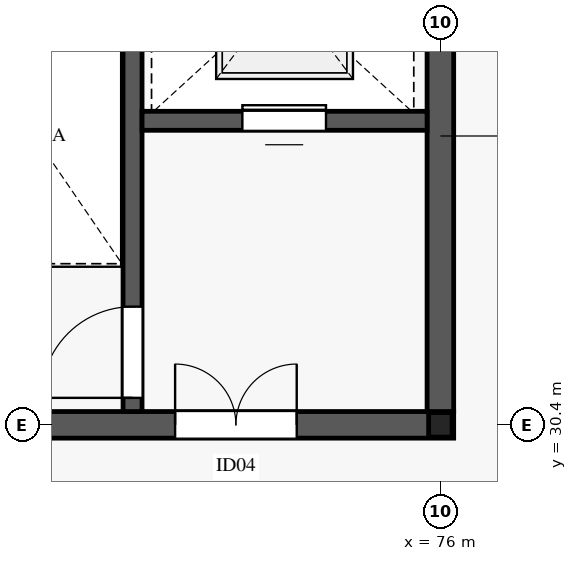
"""IFC4 building model, lengths in metres.
Left out: names, types, materials, properties, quantities, classifications, styles, units other than length and angle.
Written with IfcOpenShell. Run it as: python <this file> out.ifc"""

import sys

from ifc_helpers import new_model, si_unit, direction, frame, frame_2d, origin, origin_2d, place, context, subcontext, project, spatial, rectangle, i_section, extrude, element, fill, save


model = new_model("IFC4")
c1 = context("Model", 3, precision=1e-05, world=origin(), true_north=direction((0.0, 1.0)))
c2 = subcontext(c1, "Body", "Model", "MODEL_VIEW")
j1 = project(units=[si_unit("LENGTHUNIT", "METRE"), si_unit("PLANEANGLEUNIT", "RADIAN")], contexts=[c1])
p1 = place(None, origin())
s1 = spatial("IfcSite", under=j1, at=p1, CompositionType="ELEMENT")
p2 = place(p1, origin())
s2 = spatial("IfcBuilding", under=s1, at=p2, CompositionType="ELEMENT")
p3 = place(p2, frame((0.0, 0.0, 20.4)))
s3 = spatial("IfcBuildingStorey", under=s2, at=p3, CompositionType="ELEMENT", Elevation=20.4)
p4 = place(p3, frame((76.0, 30.4, 0.0), z_axis=(0.0, 0.0, 1.0), x_axis=(1.0, 0.0, 0.0)))
e1 = element("IfcColumn", 1, at=p4, inside=s3, PredefinedType="COLUMN", context=c2, shape_type="SweptSolid", body=[
    extrude(i_section(OverallWidth=0.309, OverallDepth=0.323, WebThickness=0.014, FlangeThickness=0.023, FilletRadius=0.015, at=origin_2d()), origin(), (0.0, 0.0, 1.0), 4.595),
])
p5 = place(p3, frame((67.825, 30.4, 0.0), z_axis=(0.0, 0.0, 1.0), x_axis=(1.0, 0.0, 0.0)))
e2 = element("IfcWall", 2, at=p5, inside=s3, PredefinedType="SHEAR", context=c2, shape_type="SweptSolid", body=[
    extrude(rectangle(XDim=8.35, YDim=0.35, at=frame_2d((4.175, 0.0))), origin(), (0.0, 0.0, 1.0), 4.59),
])
p6 = place(p5, frame((4.685, 0.0, 0.0)))
e3 = element("IfcOpeningElement", 3, at=p6, cuts=e2, PredefinedType="OPENING", context=c2, shape_type="SweptSolid", body=[
    extrude(rectangle(XDim=1.6, YDim=2.35, at=frame_2d((0.8, 1.175))), frame((0.0, 0.185, 0.0), z_axis=(0.0, -1.0, 0.0), x_axis=(1.0, 0.0, 0.0)), (0.0, 0.0, 1.0), 0.37),
])
p7 = place(p3, frame((76.0, 30.575, 0.0), z_axis=(0.0, 0.0, 1.0), x_axis=(0.0, 1.0, 0.0)))
e4 = element("IfcWall", 4, at=p7, inside=s3, PredefinedType="SHEAR", context=c2, shape_type="SweptSolid", body=[
    extrude(rectangle(XDim=7.25, YDim=0.35, at=frame_2d((3.625, 0.0))), origin(), (0.0, 0.0, 1.0), 4.59),
])
p8 = place(p3, frame((71.95, 30.575, 0.0), z_axis=(0.0, 0.0, 1.0), x_axis=(0.0, 1.0, 0.0)))
e5 = element("IfcWall", 5, at=p8, inside=s3, PredefinedType="SHEAR", context=c2, shape_type="SweptSolid", body=[
    extrude(rectangle(XDim=7.25, YDim=0.25, at=frame_2d((3.625, 0.0))), origin(), (0.0, 0.0, 1.0), 4.59),
])
p9 = place(p8, frame((0.18, 0.0, 0.0)))
e6 = element("IfcOpeningElement", 6, at=p9, cuts=e5, PredefinedType="OPENING", context=c2, shape_type="SweptSolid", body=[
    extrude(rectangle(XDim=1.2, YDim=2.2, at=frame_2d((0.6, 1.1))), frame((0.0, 0.135, 0.0), z_axis=(0.0, -1.0, 0.0), x_axis=(1.0, 0.0, 0.0)), (0.0, 0.0, 1.0), 0.27),
])
p10 = place(p3, frame((72.075, 34.4, 0.0), z_axis=(0.0, 0.0, 1.0), x_axis=(1.0, 0.0, 0.0)))
e7 = element("IfcWall", 7, at=p10, inside=s3, PredefinedType="SHEAR", context=c2, shape_type="SweptSolid", body=[
    extrude(rectangle(XDim=3.75, YDim=0.25, at=frame_2d((1.875, 0.0))), origin(), (0.0, 0.0, 1.0), 4.59),
])
p11 = place(p10, frame((1.32, 0.0, 0.0)))
e8 = element("IfcOpeningElement", 8, at=p11, cuts=e7, PredefinedType="OPENING", context=c2, shape_type="SweptSolid", body=[
    extrude(rectangle(XDim=1.1, YDim=2.2, at=frame_2d((0.55, 1.1))), frame((0.0, 0.135, 0.0), z_axis=(0.0, -1.0, 0.0), x_axis=(1.0, 0.0, 0.0)), (0.0, 0.0, 1.0), 0.27),
])
p12 = place(p9, origin())
e9 = element("IfcDoor", 9, at=p12, inside=s3, OperationType="SINGLE_SWING_LEFT", PredefinedType="DOOR", context=c2, shape_type="SweptSolid", body=[
    extrude(rectangle(XDim=1.2, YDim=2.2, at=frame_2d((0.6, 1.1))), frame((0.0, 0.025, 0.0), z_axis=(0.0, -1.0, 0.0), x_axis=(1.0, 0.0, 0.0)), (0.0, 0.0, 1.0), 0.05),
])
fill(e6, e9)
p13 = place(p6, origin())
e10 = element("IfcDoor", 10, at=p13, inside=s3, OperationType="DOUBLE_DOOR_SINGLE_SWING", PredefinedType="DOOR", context=c2, shape_type="SweptSolid", body=[
    extrude(rectangle(XDim=1.6, YDim=2.35, at=frame_2d((0.8, 1.175))), frame((0.0, 0.025, 0.0), z_axis=(0.0, -1.0, 0.0), x_axis=(1.0, 0.0, 0.0)), (0.0, 0.0, 1.0), 0.05),
])
fill(e3, e10)
p14 = place(p11, origin())
e11 = element("IfcDoor", 11, at=p14, inside=s3, OperationType="SLIDING_TO_LEFT", PredefinedType="DOOR", context=c2, shape_type="SweptSolid", body=[
    extrude(rectangle(XDim=1.1, YDim=2.2, at=frame_2d((0.55, 1.1))), frame((0.0, 0.025, 0.0), z_axis=(0.0, -1.0, 0.0), x_axis=(1.0, 0.0, 0.0)), (0.0, 0.0, 1.0), 0.05),
])
fill(e8, e11)
save(model, sys.argv[1])
